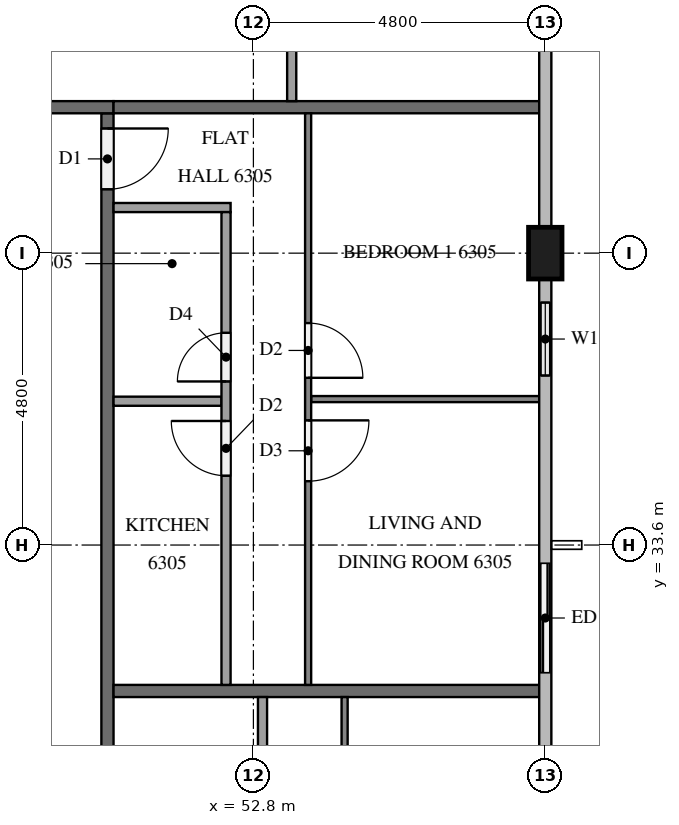
"""IFC4 building model, lengths in metres.
Left out: names, types, materials, properties, quantities, classifications, styles, units other than length and angle.
Written with IfcOpenShell. Run it as: python <this file> out.ifc"""

import sys

from ifc_helpers import new_model, si_unit, direction, frame, frame_2d, origin, origin_2d, place, context, subcontext, project, spatial, rectangle, extrude, element, fill, save


model = new_model("IFC4")
c1 = context("Model", 3, precision=1e-05, world=origin(), true_north=direction((0.0, 1.0)))
c2 = subcontext(c1, "Body", "Model", "MODEL_VIEW")
j1 = project(units=[si_unit("LENGTHUNIT", "METRE"), si_unit("PLANEANGLEUNIT", "RADIAN")], contexts=[c1])
p1 = place(None, origin())
s1 = spatial("IfcSite", under=j1, at=p1, CompositionType="ELEMENT")
p2 = place(p1, origin())
s2 = spatial("IfcBuilding", under=s1, at=p2, CompositionType="ELEMENT")
p3 = place(p2, frame((0.0, 0.0, 242.2)))
s3 = spatial("IfcBuildingStorey", under=s2, at=p3, CompositionType="ELEMENT", Elevation=242.2)
p4 = place(p3, frame((57.6, 38.4, 0.0), z_axis=(0.0, 0.0, 1.0), x_axis=(0.0, 1.0, 0.0)))
e1 = element("IfcColumn", 1, at=p4, inside=s3, PredefinedType="COLUMN", context=c2, shape_type="SweptSolid", body=[
    extrude(rectangle(XDim=0.85, YDim=0.55, at=origin_2d()), origin(), (0.0, 0.0, 1.0), 3.2),
])
p5 = place(p3, frame((57.6, 31.2, 0.0), z_axis=(0.0, 0.0, 1.0), x_axis=(0.0, 1.0, 0.0)))
e2 = element("IfcWall", 2, at=p5, inside=s3, PredefinedType="SOLIDWALL", context=c2, shape_type="SweptSolid", body=[
    extrude(rectangle(XDim=2.4, YDim=0.15, at=frame_2d((1.2, 0.0))), origin(), (0.0, 0.0, 1.0), 3.2),
])
p6 = place(p5, frame((0.3, 0.0, 0.0)))
e3 = element("IfcOpeningElement", 3, at=p6, cuts=e2, PredefinedType="OPENING", context=c2, shape_type="SweptSolid", body=[
    extrude(rectangle(XDim=1.8, YDim=2.4, at=frame_2d((0.9, 1.2))), frame((0.0, 0.085, 0.0), z_axis=(0.0, -1.0, 0.0), x_axis=(1.0, 0.0, 0.0)), (0.0, 0.0, 1.0), 0.17),
])
p7 = place(p3, frame((57.6, 36.0, 0.0), z_axis=(0.0, 0.0, 1.0), x_axis=(0.0, 1.0, 0.0)))
e4 = element("IfcWall", 4, at=p7, inside=s3, PredefinedType="SOLIDWALL", context=c2, shape_type="SweptSolid", body=[
    extrude(rectangle(XDim=1.975, YDim=0.15, at=frame_2d((0.988, 0.0))), origin(), (0.0, 0.0, 1.0), 3.2),
])
p8 = place(p7, frame((0.387, 0.0, 0.9)))
e5 = element("IfcOpeningElement", 5, at=p8, cuts=e4, PredefinedType="OPENING", context=c2, shape_type="SweptSolid", body=[
    extrude(rectangle(XDim=1.2, YDim=1.4, at=frame_2d((0.6, 0.7))), frame((0.0, 0.085, 0.0), z_axis=(0.0, -1.0, 0.0), x_axis=(1.0, 0.0, 0.0)), (0.0, 0.0, 1.0), 0.17),
])
p9 = place(p3, frame((50.4, 40.7, 0.0), z_axis=(0.0, 0.0, 1.0), x_axis=(0.0, -1.0, 0.0)))
e6 = element("IfcWall", 6, at=p9, inside=s3, PredefinedType="PARTITIONING", context=c2, shape_type="SweptSolid", body=[
    extrude(rectangle(XDim=28.6, YDim=0.2, at=frame_2d((14.3, 0.0))), origin(), (0.0, 0.0, 1.0), 3.2),
])
p10 = place(p9, frame((27.3, 0.0, 0.0)))
e7 = element("IfcOpeningElement", 7, at=p10, cuts=e6, PredefinedType="OPENING", context=c2, shape_type="SweptSolid", body=[
    extrude(rectangle(XDim=1.1, YDim=2.1, at=frame_2d((0.55, 1.05))), frame((0.0, 0.11, 0.0), z_axis=(0.0, -1.0, 0.0), x_axis=(1.0, 0.0, 0.0)), (0.0, 0.0, 1.0), 0.22),
])
p11 = place(p9, frame((0.25, 0.0, 0.0)))
e8 = element("IfcOpeningElement", 8, at=p11, cuts=e6, PredefinedType="OPENING", context=c2, shape_type="SweptSolid", body=[
    extrude(rectangle(XDim=1.0, YDim=2.1, at=frame_2d((0.5, 1.05))), frame((0.0, 0.11, 0.0), z_axis=(0.0, -1.0, 0.0), x_axis=(1.0, 0.0, 0.0)), (0.0, 0.0, 1.0), 0.22),
])
p12 = place(p3, frame((11.9, 40.8, 0.0), z_axis=(0.0, 0.0, 1.0), x_axis=(1.0, 0.0, 0.0)))
e9 = element("IfcWall", 9, at=p12, inside=s3, PredefinedType="PARTITIONING", context=c2, shape_type="SweptSolid", body=[
    extrude(rectangle(XDim=38.6, YDim=0.2, at=frame_2d((19.3, 0.0))), origin(), (0.0, 0.0, 1.0), 3.2),
])
p13 = place(p12, frame((34.05, 0.0, 0.0)))
e10 = element("IfcOpeningElement", 10, at=p13, cuts=e9, PredefinedType="OPENING", context=c2, shape_type="SweptSolid", body=[
    extrude(rectangle(XDim=1.0, YDim=2.1, at=frame_2d((0.5, 1.05))), frame((0.0, 0.11, 0.0), z_axis=(0.0, -1.0, 0.0), x_axis=(1.0, 0.0, 0.0)), (0.0, 0.0, 1.0), 0.22),
])
p14 = place(p12, frame((32.3, 0.0, 0.0)))
e11 = element("IfcOpeningElement", 11, at=p14, cuts=e9, PredefinedType="OPENING", context=c2, shape_type="SweptSolid", body=[
    extrude(rectangle(XDim=1.1, YDim=2.1, at=frame_2d((0.55, 1.05))), frame((0.0, 0.11, 0.0), z_axis=(0.0, -1.0, 0.0), x_axis=(1.0, 0.0, 0.0)), (0.0, 0.0, 1.0), 0.22),
])
p15 = place(p12, frame((2.85, 0.0, 0.0)))
e12 = element("IfcOpeningElement", 12, at=p15, cuts=e9, PredefinedType="OPENING", context=c2, shape_type="SweptSolid", body=[
    extrude(rectangle(XDim=1.0, YDim=2.1, at=frame_2d((0.5, 1.05))), frame((0.0, 0.11, 0.0), z_axis=(0.0, -1.0, 0.0), x_axis=(1.0, 0.0, 0.0)), (0.0, 0.0, 1.0), 0.22),
])
p16 = place(p12, frame((1.15, 0.0, 0.0)))
e13 = element("IfcOpeningElement", 13, at=p16, cuts=e9, PredefinedType="OPENING", context=c2, shape_type="SweptSolid", body=[
    extrude(rectangle(XDim=1.0, YDim=2.1, at=frame_2d((0.5, 1.05))), frame((0.0, 0.11, 0.0), z_axis=(0.0, -1.0, 0.0), x_axis=(1.0, 0.0, 0.0)), (0.0, 0.0, 1.0), 0.22),
])
for number, where, z_axis, x_axis in (
    (14, (50.5, 31.2, 0.0), (0.0, 0.0, 1.0), (1.0, 0.0, 0.0)),
    (15, (50.5, 40.8, 0.0), (0.0, 0.0, 1.0), (1.0, 0.0, 0.0)),
):
    element("IfcWall", number, at=place(p3, frame(where, z_axis=z_axis, x_axis=x_axis)), inside=s3, PredefinedType="PARTITIONING", context=c2, shape_type="SweptSolid", body=[
        extrude(rectangle(XDim=7.0, YDim=0.2, at=frame_2d((3.5, 0.0))), origin(), (0.0, 0.0, 1.0), 3.2),
    ])
p17 = place(p3, frame((54.3, 31.1, 0.0), z_axis=(0.0, 0.0, 1.0), x_axis=(0.0, -1.0, 0.0)))
e16 = element("IfcWall", 16, at=p17, inside=s3, PredefinedType="PARTITIONING", context=c2, shape_type="SweptSolid", body=[
    extrude(rectangle(XDim=19.0, YDim=0.1, at=frame_2d((9.5, 0.0))), origin(), (0.0, 0.0, 1.0), 3.2),
])
p18 = place(p17, frame((14.65, 0.0, 0.0)))
e17 = element("IfcOpeningElement", 17, at=p18, cuts=e16, PredefinedType="OPENING", context=c2, shape_type="SweptSolid", body=[
    extrude(rectangle(XDim=0.9, YDim=2.1, at=frame_2d((0.45, 1.05))), frame((0.0, 0.06, 0.0), z_axis=(0.0, -1.0, 0.0), x_axis=(1.0, 0.0, 0.0)), (0.0, 0.0, 1.0), 0.12),
])
p19 = place(p17, frame((12.95, 0.0, 0.0)))
e18 = element("IfcOpeningElement", 18, at=p19, cuts=e16, PredefinedType="OPENING", context=c2, shape_type="SweptSolid", body=[
    extrude(rectangle(XDim=1.0, YDim=2.1, at=frame_2d((0.5, 1.05))), frame((0.0, 0.06, 0.0), z_axis=(0.0, -1.0, 0.0), x_axis=(1.0, 0.0, 0.0)), (0.0, 0.0, 1.0), 0.12),
])
p20 = place(p17, frame((5.05, 0.0, 0.0)))
e19 = element("IfcOpeningElement", 19, at=p20, cuts=e16, PredefinedType="OPENING", context=c2, shape_type="SweptSolid", body=[
    extrude(rectangle(XDim=0.9, YDim=2.1, at=frame_2d((0.45, 1.05))), frame((0.0, 0.06, 0.0), z_axis=(0.0, -1.0, 0.0), x_axis=(1.0, 0.0, 0.0)), (0.0, 0.0, 1.0), 0.12),
])
p21 = place(p17, frame((3.45, 0.0, 0.0)))
e20 = element("IfcOpeningElement", 20, at=p21, cuts=e16, PredefinedType="OPENING", context=c2, shape_type="SweptSolid", body=[
    extrude(rectangle(XDim=0.9, YDim=2.1, at=frame_2d((0.45, 1.05))), frame((0.0, 0.06, 0.0), z_axis=(0.0, -1.0, 0.0), x_axis=(1.0, 0.0, 0.0)), (0.0, 0.0, 1.0), 0.12),
])
p22 = place(p3, frame((52.95, 13.725, 0.0), z_axis=(0.0, 0.0, 1.0), x_axis=(0.0, 1.0, 0.0)))
e21 = element("IfcWall", 21, at=p22, inside=s3, PredefinedType="PARTITIONING", context=c2, shape_type="SweptSolid", body=[
    extrude(rectangle(XDim=17.375, YDim=0.15, at=frame_2d((8.688, 0.0))), origin(), (0.0, 0.0, 1.0), 3.2),
])
p23 = place(p22, frame((2.133, 0.0, 0.0)))
e22 = element("IfcOpeningElement", 22, at=p23, cuts=e21, PredefinedType="OPENING", context=c2, shape_type="SweptSolid", body=[
    extrude(rectangle(XDim=0.8, YDim=2.1, at=frame_2d((0.4, 1.05))), frame((0.0, 0.085, 0.0), z_axis=(0.0, -1.0, 0.0), x_axis=(1.0, 0.0, 0.0)), (0.0, 0.0, 1.0), 0.17),
])
p24 = place(p22, frame((3.583, 0.0, 0.0)))
e23 = element("IfcOpeningElement", 23, at=p24, cuts=e21, PredefinedType="OPENING", context=c2, shape_type="SweptSolid", body=[
    extrude(rectangle(XDim=0.9, YDim=2.1, at=frame_2d((0.45, 1.05))), frame((0.0, 0.085, 0.0), z_axis=(0.0, -1.0, 0.0), x_axis=(1.0, 0.0, 0.0)), (0.0, 0.0, 1.0), 0.17),
])
p25 = place(p22, frame((12.892, 0.0, 0.0)))
e24 = element("IfcOpeningElement", 24, at=p25, cuts=e21, PredefinedType="OPENING", context=c2, shape_type="SweptSolid", body=[
    extrude(rectangle(XDim=0.9, YDim=2.1, at=frame_2d((0.45, 1.05))), frame((0.0, 0.085, 0.0), z_axis=(0.0, -1.0, 0.0), x_axis=(1.0, 0.0, 0.0)), (0.0, 0.0, 1.0), 0.17),
])
p26 = place(p22, frame((14.442, 0.0, 0.0)))
e25 = element("IfcOpeningElement", 25, at=p26, cuts=e21, PredefinedType="OPENING", context=c2, shape_type="SweptSolid", body=[
    extrude(rectangle(XDim=0.8, YDim=2.1, at=frame_2d((0.4, 1.05))), frame((0.0, 0.085, 0.0), z_axis=(0.0, -1.0, 0.0), x_axis=(1.0, 0.0, 0.0)), (0.0, 0.0, 1.0), 0.17),
])
p27 = place(p3, frame((53.75, 36.0, 0.0), z_axis=(0.0, 0.0, 1.0), x_axis=(1.0, 0.0, 0.0)))
e26 = element("IfcWall", 26, at=p27, inside=s3, PredefinedType="PARTITIONING", context=c2, shape_type="SweptSolid", body=[
    extrude(rectangle(XDim=3.75, YDim=0.1, at=frame_2d((1.875, 0.0))), origin(), (0.0, 0.0, 1.0), 3.2),
])
p28 = place(p3, frame((53.7, 40.7, 0.0), z_axis=(0.0, 0.0, 1.0), x_axis=(0.0, -1.0, 0.0)))
e27 = element("IfcWall", 27, at=p28, inside=s3, PredefinedType="PARTITIONING", context=c2, shape_type="SweptSolid", body=[
    extrude(rectangle(XDim=9.4, YDim=0.1, at=frame_2d((4.7, 0.0))), origin(), (0.0, 0.0, 1.0), 3.2),
])
p29 = place(p28, frame((3.45, 0.0, 0.0)))
e28 = element("IfcOpeningElement", 28, at=p29, cuts=e27, PredefinedType="OPENING", context=c2, shape_type="SweptSolid", body=[
    extrude(rectangle(XDim=0.9, YDim=2.1, at=frame_2d((0.45, 1.05))), frame((0.0, 0.06, 0.0), z_axis=(0.0, -1.0, 0.0), x_axis=(1.0, 0.0, 0.0)), (0.0, 0.0, 1.0), 0.12),
])
p30 = place(p28, frame((5.05, 0.0, 0.0)))
e29 = element("IfcOpeningElement", 29, at=p30, cuts=e27, PredefinedType="OPENING", context=c2, shape_type="SweptSolid", body=[
    extrude(rectangle(XDim=1.0, YDim=2.1, at=frame_2d((0.5, 1.05))), frame((0.0, 0.06, 0.0), z_axis=(0.0, -1.0, 0.0), x_axis=(1.0, 0.0, 0.0)), (0.0, 0.0, 1.0), 0.12),
])
p31 = place(p3, frame((50.5, 35.965, 0.0), z_axis=(0.0, 0.0, 1.0), x_axis=(1.0, 0.0, 0.0)))
e30 = element("IfcWall", 30, at=p31, inside=s3, PredefinedType="PARTITIONING", context=c2, shape_type="SweptSolid", body=[
    extrude(rectangle(XDim=1.775, YDim=0.15, at=frame_2d((0.887, 0.0))), origin(), (0.0, 0.0, 1.0), 3.2),
])
p32 = place(p3, frame((50.5, 39.15, 0.0), z_axis=(0.0, 0.0, 1.0), x_axis=(1.0, 0.0, 0.0)))
e31 = element("IfcWall", 31, at=p32, inside=s3, PredefinedType="PARTITIONING", context=c2, shape_type="SweptSolid", body=[
    extrude(rectangle(XDim=1.925, YDim=0.15, at=frame_2d((0.962, 0.0))), origin(), (0.0, 0.0, 1.0), 3.2),
])
p33 = place(p3, frame((52.35, 31.3, 0.0), z_axis=(0.0, 0.0, 1.0), x_axis=(0.0, 1.0, 0.0)))
e32 = element("IfcWall", 32, at=p33, inside=s3, PredefinedType="PARTITIONING", context=c2, shape_type="SweptSolid", body=[
    extrude(rectangle(XDim=7.775, YDim=0.15, at=frame_2d((3.887, 0.0))), origin(), (0.0, 0.0, 1.0), 3.2),
])
p34 = place(p33, frame((4.99, 0.0, 0.0)))
e33 = element("IfcOpeningElement", 33, at=p34, cuts=e32, PredefinedType="OPENING", context=c2, shape_type="SweptSolid", body=[
    extrude(rectangle(XDim=0.8, YDim=2.1, at=frame_2d((0.4, 1.05))), frame((0.0, 0.085, 0.0), z_axis=(0.0, -1.0, 0.0), x_axis=(1.0, 0.0, 0.0)), (0.0, 0.0, 1.0), 0.17),
])
p35 = place(p33, frame((3.44, 0.0, 0.0)))
e34 = element("IfcOpeningElement", 34, at=p35, cuts=e32, PredefinedType="OPENING", context=c2, shape_type="SweptSolid", body=[
    extrude(rectangle(XDim=0.9, YDim=2.1, at=frame_2d((0.45, 1.05))), frame((0.0, 0.085, 0.0), z_axis=(0.0, -1.0, 0.0), x_axis=(1.0, 0.0, 0.0)), (0.0, 0.0, 1.0), 0.17),
])
p36 = place(p3, frame((53.43, 40.9, 0.0), z_axis=(0.0, 0.0, 1.0), x_axis=(0.0, 1.0, 0.0)))
e35 = element("IfcWall", 35, at=p36, inside=s3, PredefinedType="PARTITIONING", context=c2, shape_type="SweptSolid", body=[
    extrude(rectangle(XDim=4.175, YDim=0.15, at=frame_2d((2.087, 0.0))), origin(), (0.0, 0.0, 1.0), 3.2),
])
p37 = place(p6, origin())
e36 = element("IfcDoor", 36, at=p37, inside=s3, OperationType="SLIDING_TO_LEFT", PredefinedType="DOOR", context=c2, shape_type="SweptSolid", body=[
    extrude(rectangle(XDim=1.8, YDim=2.4, at=frame_2d((0.9, 1.2))), frame((0.0, 0.025, 0.0), z_axis=(0.0, -1.0, 0.0), x_axis=(1.0, 0.0, 0.0)), (0.0, 0.0, 1.0), 0.05),
])
fill(e3, e36)
p38 = place(p8, origin())
e37 = element("IfcWindow", 37, at=p38, inside=s3, PartitioningType="SINGLE_PANEL", PredefinedType="WINDOW", context=c2, shape_type="SweptSolid", body=[
    extrude(rectangle(XDim=1.2, YDim=1.4, at=frame_2d((0.6, 0.7))), frame((0.0, 0.03, 0.0), z_axis=(0.0, -1.0, 0.0), x_axis=(1.0, 0.0, 0.0)), (0.0, 0.0, 1.0), 0.06),
])
fill(e5, e37)
p39 = place(p11, origin())
e38 = element("IfcDoor", 38, at=p39, inside=s3, OperationType="SINGLE_SWING_LEFT", PredefinedType="DOOR", context=c2, shape_type="SweptSolid", body=[
    extrude(rectangle(XDim=1.0, YDim=2.1, at=frame_2d((0.5, 1.05))), frame((0.0, 0.025, 0.0), z_axis=(0.0, -1.0, 0.0), x_axis=(1.0, 0.0, 0.0)), (0.0, 0.0, 1.0), 0.05),
])
fill(e8, e38)
p40 = place(p29, origin())
e39 = element("IfcDoor", 39, at=p40, inside=s3, OperationType="SINGLE_SWING_RIGHT", PredefinedType="DOOR", context=c2, shape_type="SweptSolid", body=[
    extrude(rectangle(XDim=0.9, YDim=2.1, at=frame_2d((0.45, 1.05))), frame((0.0, 0.025, 0.0), z_axis=(0.0, -1.0, 0.0), x_axis=(1.0, 0.0, 0.0)), (0.0, 0.0, 1.0), 0.05),
])
fill(e28, e39)
p41 = place(p30, origin())
e40 = element("IfcDoor", 40, at=p41, inside=s3, OperationType="SINGLE_SWING_LEFT", PredefinedType="DOOR", context=c2, shape_type="SweptSolid", body=[
    extrude(rectangle(XDim=1.0, YDim=2.1, at=frame_2d((0.5, 1.05))), frame((0.0, 0.025, 0.0), z_axis=(0.0, -1.0, 0.0), x_axis=(1.0, 0.0, 0.0)), (0.0, 0.0, 1.0), 0.05),
])
fill(e29, e40)
p42 = place(p34, origin())
e41 = element("IfcDoor", 41, at=p42, inside=s3, OperationType="SINGLE_SWING_LEFT", PredefinedType="DOOR", context=c2, shape_type="SweptSolid", body=[
    extrude(rectangle(XDim=0.8, YDim=2.1, at=frame_2d((0.4, 1.05))), frame((0.0, 0.025, 0.0), z_axis=(0.0, -1.0, 0.0), x_axis=(1.0, 0.0, 0.0)), (0.0, 0.0, 1.0), 0.05),
])
fill(e33, e41)
p43 = place(p35, origin())
e42 = element("IfcDoor", 42, at=p43, inside=s3, OperationType="SINGLE_SWING_RIGHT", PredefinedType="DOOR", context=c2, shape_type="SweptSolid", body=[
    extrude(rectangle(XDim=0.9, YDim=2.1, at=frame_2d((0.45, 1.05))), frame((0.0, 0.025, 0.0), z_axis=(0.0, -1.0, 0.0), x_axis=(1.0, 0.0, 0.0)), (0.0, 0.0, 1.0), 0.05),
])
fill(e34, e42)
save(model, sys.argv[1])
